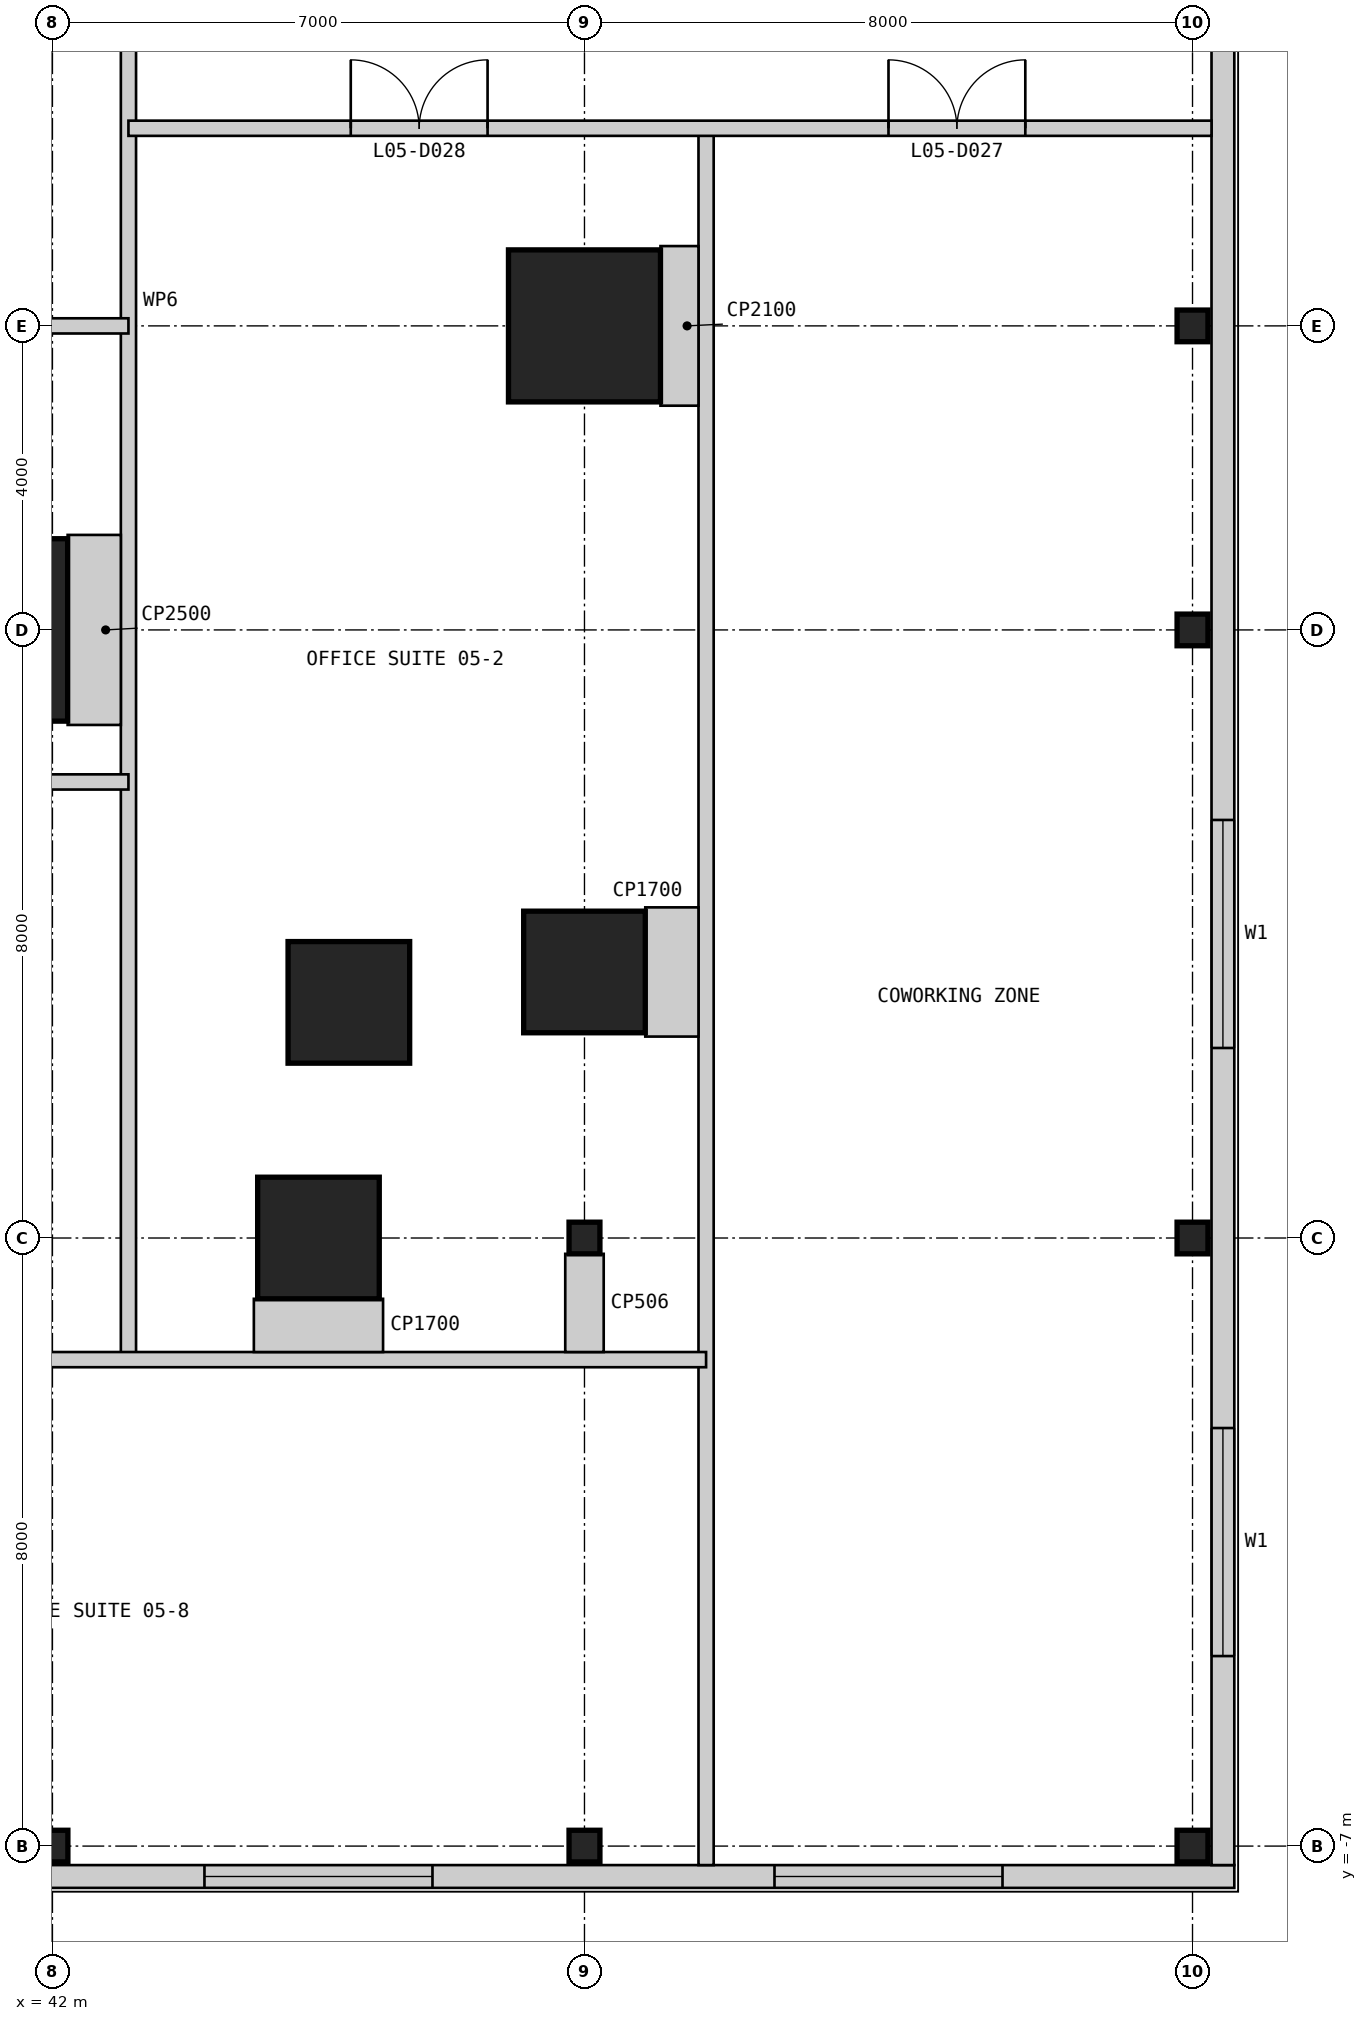
"""IFC4 building model, lengths in metres.
Left out: names, types, materials, properties, quantities, classifications, styles, units other than length and angle.
Written with IfcOpenShell. Run it as: python <this file> out.ifc"""

import sys

from ifc_helpers import new_model, si_unit, direction, frame, frame_2d, origin, origin_2d, place, context, subcontext, project, spatial, rectangle, i_section, extrude, element, fill, save


model = new_model("IFC4")
c1 = context("Model", 3, precision=1e-05, world=origin(), true_north=direction((0.0, 1.0)))
c2 = subcontext(c1, "Body", "Model", "MODEL_VIEW")
j1 = project(units=[si_unit("LENGTHUNIT", "METRE"), si_unit("PLANEANGLEUNIT", "RADIAN")], contexts=[c1])
p1 = place(None, origin())
s1 = spatial("IfcSite", under=j1, at=p1, CompositionType="ELEMENT")
p2 = place(p1, origin())
s2 = spatial("IfcBuilding", under=s1, at=p2, CompositionType="ELEMENT")
p3 = place(p2, frame((0.0, 0.0, 26.2)))
s3 = spatial("IfcBuildingStorey", under=s2, at=p3, CompositionType="ELEMENT", Elevation=26.2)
p4 = place(p3, frame((41.0, 9.0, 0.0), z_axis=(0.0, 0.0, 1.0), x_axis=(1.0, 0.0, 0.0)))
e1 = element("IfcColumn", 1, at=p4, inside=s3, PredefinedType="COLUMN", context=c2, shape_type="SweptSolid", body=[
    extrude(rectangle(XDim=2.4, YDim=2.4, at=origin_2d()), origin(), (0.0, 0.0, 1.0), 4.8),
])
for number, where, z_axis, x_axis in (
    (2, (45.5, 1.0, 0.0), (0.0, 0.0, 1.0), (1.0, 0.0, 0.0)),
    (3, (45.9, 4.1, 0.0), (0.0, 0.0, 1.0), (1.0, 0.0, 0.0)),
    (4, (49.0, 4.5, 0.0), (0.0, 0.0, 1.0), (1.0, 0.0, 0.0)),
):
    element("IfcColumn", number, at=place(p3, frame(where, z_axis=z_axis, x_axis=x_axis)), inside=s3, PredefinedType="COLUMN", context=c2, shape_type="SweptSolid", body=[
        extrude(rectangle(XDim=1.6, YDim=1.6, at=origin_2d()), origin(), (0.0, 0.0, 1.0), 4.8),
    ])
p5 = place(p3, frame((49.0, 13.0, 0.0), z_axis=(0.0, 0.0, 1.0), x_axis=(1.0, 0.0, 0.0)))
e5 = element("IfcColumn", 5, at=p5, inside=s3, PredefinedType="COLUMN", context=c2, shape_type="SweptSolid", body=[
    extrude(rectangle(XDim=2.0, YDim=2.0, at=origin_2d()), origin(), (0.0, 0.0, 1.0), 4.8),
])
for number, where, z_axis, x_axis in (
    (6, (42.0, -7.0, 0.0), (0.0, 0.0, 1.0), (1.0, 0.0, 0.0)),
    (7, (49.0, -7.0, 0.0), (0.0, 0.0, 1.0), (1.0, 0.0, 0.0)),
    (8, (49.0, 1.0, 0.0), (0.0, 0.0, 1.0), (1.0, 0.0, 0.0)),
    (9, (57.0, -7.0, 0.0), (0.0, 0.0, 1.0), (1.0, 0.0, 0.0)),
    (10, (57.0, 1.0, 0.0), (0.0, 0.0, 1.0), (1.0, 0.0, 0.0)),
    (11, (57.0, 9.0, 0.0), (0.0, 0.0, 1.0), (1.0, 0.0, 0.0)),
    (12, (57.0, 13.0, 0.0), (0.0, 0.0, 1.0), (1.0, 0.0, 0.0)),
):
    element("IfcColumn", number, at=place(p3, frame(where, z_axis=z_axis, x_axis=x_axis)), inside=s3, PredefinedType="COLUMN", context=c2, shape_type="SweptSolid", body=[
        extrude(i_section(OverallWidth=0.406, OverallDepth=0.417, WebThickness=0.03, FlangeThickness=0.048, at=origin_2d()), origin(), (0.0, 0.0, 1.0), 4.8),
    ])
p6 = place(p3, frame((-7.55, -7.4, 0.0), z_axis=(0.0, 0.0, 1.0), x_axis=(1.0, 0.0, 0.0)))
e13 = element("IfcWall", 13, at=p6, inside=s3, PredefinedType="SOLIDWALL", context=c2, shape_type="SweptSolid", body=[
    extrude(rectangle(XDim=65.1, YDim=0.3, at=frame_2d((32.55, 0.0))), origin(), (0.0, 0.0, 1.0), 4.5),
])
p7 = place(p6, frame((3.05, 0.0, 0.9)))
e14 = element("IfcOpeningElement", 14, at=p7, cuts=e13, PredefinedType="OPENING", context=c2, shape_type="SweptSolid", body=[
    extrude(rectangle(XDim=3.0, YDim=2.4, at=frame_2d((1.5, 1.2))), frame((0.0, 0.16, 0.0), z_axis=(0.0, -1.0, 0.0), x_axis=(1.0, 0.0, 0.0)), (0.0, 0.0, 1.0), 0.32),
])
p8 = place(p6, frame((11.05, 0.0, 0.9)))
e15 = element("IfcOpeningElement", 15, at=p8, cuts=e13, PredefinedType="OPENING", context=c2, shape_type="SweptSolid", body=[
    extrude(rectangle(XDim=3.0, YDim=2.4, at=frame_2d((1.5, 1.2))), frame((0.0, 0.16, 0.0), z_axis=(0.0, -1.0, 0.0), x_axis=(1.0, 0.0, 0.0)), (0.0, 0.0, 1.0), 0.32),
])
p9 = place(p6, frame((25.05, 0.0, 0.9)))
e16 = element("IfcOpeningElement", 16, at=p9, cuts=e13, PredefinedType="OPENING", context=c2, shape_type="SweptSolid", body=[
    extrude(rectangle(XDim=3.0, YDim=2.4, at=frame_2d((1.5, 1.2))), frame((0.0, 0.16, 0.0), z_axis=(0.0, -1.0, 0.0), x_axis=(1.0, 0.0, 0.0)), (0.0, 0.0, 1.0), 0.32),
])
p10 = place(p6, frame((37.05, 0.0, 0.9)))
e17 = element("IfcOpeningElement", 17, at=p10, cuts=e13, PredefinedType="OPENING", context=c2, shape_type="SweptSolid", body=[
    extrude(rectangle(XDim=3.0, YDim=2.4, at=frame_2d((1.5, 1.2))), frame((0.0, 0.16, 0.0), z_axis=(0.0, -1.0, 0.0), x_axis=(1.0, 0.0, 0.0)), (0.0, 0.0, 1.0), 0.32),
])
p11 = place(p6, frame((45.55, 0.0, 0.9)))
e18 = element("IfcOpeningElement", 18, at=p11, cuts=e13, PredefinedType="OPENING", context=c2, shape_type="SweptSolid", body=[
    extrude(rectangle(XDim=3.0, YDim=2.4, at=frame_2d((1.5, 1.2))), frame((0.0, 0.16, 0.0), z_axis=(0.0, -1.0, 0.0), x_axis=(1.0, 0.0, 0.0)), (0.0, 0.0, 1.0), 0.32),
])
p12 = place(p6, frame((51.55, 0.0, 0.9)))
e19 = element("IfcOpeningElement", 19, at=p12, cuts=e13, PredefinedType="OPENING", context=c2, shape_type="SweptSolid", body=[
    extrude(rectangle(XDim=3.0, YDim=2.4, at=frame_2d((1.5, 1.2))), frame((0.0, 0.16, 0.0), z_axis=(0.0, -1.0, 0.0), x_axis=(1.0, 0.0, 0.0)), (0.0, 0.0, 1.0), 0.32),
])
p13 = place(p6, frame((59.05, 0.0, 0.9)))
e20 = element("IfcOpeningElement", 20, at=p13, cuts=e13, PredefinedType="OPENING", context=c2, shape_type="SweptSolid", body=[
    extrude(rectangle(XDim=3.0, YDim=2.4, at=frame_2d((1.5, 1.2))), frame((0.0, 0.16, 0.0), z_axis=(0.0, -1.0, 0.0), x_axis=(1.0, 0.0, 0.0)), (0.0, 0.0, 1.0), 0.32),
])
p14 = place(p3, frame((57.4, -7.25, 0.0), z_axis=(0.0, 0.0, 1.0), x_axis=(0.0, 1.0, 0.0)))
e21 = element("IfcWall", 21, at=p14, inside=s3, PredefinedType="SOLIDWALL", context=c2, shape_type="SweptSolid", body=[
    extrude(rectangle(XDim=72.5, YDim=0.3, at=frame_2d((36.25, 0.0))), origin(), (0.0, 0.0, 1.0), 4.5),
])
p15 = place(p14, frame((2.75, 0.0, 0.9)))
e22 = element("IfcOpeningElement", 22, at=p15, cuts=e21, PredefinedType="OPENING", context=c2, shape_type="SweptSolid", body=[
    extrude(rectangle(XDim=3.0, YDim=2.4, at=frame_2d((1.5, 1.2))), frame((0.0, 0.16, 0.0), z_axis=(0.0, -1.0, 0.0), x_axis=(1.0, 0.0, 0.0)), (0.0, 0.0, 1.0), 0.32),
])
p16 = place(p14, frame((10.75, 0.0, 0.9)))
e23 = element("IfcOpeningElement", 23, at=p16, cuts=e21, PredefinedType="OPENING", context=c2, shape_type="SweptSolid", body=[
    extrude(rectangle(XDim=3.0, YDim=2.4, at=frame_2d((1.5, 1.2))), frame((0.0, 0.16, 0.0), z_axis=(0.0, -1.0, 0.0), x_axis=(1.0, 0.0, 0.0)), (0.0, 0.0, 1.0), 0.32),
])
p17 = place(p14, frame((24.75, 0.0, 0.9)))
e24 = element("IfcOpeningElement", 24, at=p17, cuts=e21, PredefinedType="OPENING", context=c2, shape_type="SweptSolid", body=[
    extrude(rectangle(XDim=3.0, YDim=2.4, at=frame_2d((1.5, 1.2))), frame((0.0, 0.16, 0.0), z_axis=(0.0, -1.0, 0.0), x_axis=(1.0, 0.0, 0.0)), (0.0, 0.0, 1.0), 0.32),
])
p18 = place(p14, frame((36.75, 0.0, 0.9)))
e25 = element("IfcOpeningElement", 25, at=p18, cuts=e21, PredefinedType="OPENING", context=c2, shape_type="SweptSolid", body=[
    extrude(rectangle(XDim=3.0, YDim=2.4, at=frame_2d((1.5, 1.2))), frame((0.0, 0.16, 0.0), z_axis=(0.0, -1.0, 0.0), x_axis=(1.0, 0.0, 0.0)), (0.0, 0.0, 1.0), 0.32),
])
p19 = place(p14, frame((45.25, 0.0, 0.9)))
e26 = element("IfcOpeningElement", 26, at=p19, cuts=e21, PredefinedType="OPENING", context=c2, shape_type="SweptSolid", body=[
    extrude(rectangle(XDim=3.0, YDim=2.4, at=frame_2d((1.5, 1.2))), frame((0.0, 0.16, 0.0), z_axis=(0.0, -1.0, 0.0), x_axis=(1.0, 0.0, 0.0)), (0.0, 0.0, 1.0), 0.32),
])
p20 = place(p14, frame((51.25, 0.0, 0.9)))
e27 = element("IfcOpeningElement", 27, at=p20, cuts=e21, PredefinedType="OPENING", context=c2, shape_type="SweptSolid", body=[
    extrude(rectangle(XDim=3.0, YDim=2.4, at=frame_2d((1.5, 1.2))), frame((0.0, 0.16, 0.0), z_axis=(0.0, -1.0, 0.0), x_axis=(1.0, 0.0, 0.0)), (0.0, 0.0, 1.0), 0.32),
])
p21 = place(p14, frame((58.75, 0.0, 0.9)))
e28 = element("IfcOpeningElement", 28, at=p21, cuts=e21, PredefinedType="OPENING", context=c2, shape_type="SweptSolid", body=[
    extrude(rectangle(XDim=3.0, YDim=2.4, at=frame_2d((1.5, 1.2))), frame((0.0, 0.16, 0.0), z_axis=(0.0, -1.0, 0.0), x_axis=(1.0, 0.0, 0.0)), (0.0, 0.0, 1.0), 0.32),
])
p22 = place(p14, frame((66.75, 0.0, 0.9)))
e29 = element("IfcOpeningElement", 29, at=p22, cuts=e21, PredefinedType="OPENING", context=c2, shape_type="SweptSolid", body=[
    extrude(rectangle(XDim=3.0, YDim=2.4, at=frame_2d((1.5, 1.2))), frame((0.0, 0.16, 0.0), z_axis=(0.0, -1.0, 0.0), x_axis=(1.0, 0.0, 0.0)), (0.0, 0.0, 1.0), 0.32),
])
p23 = place(p3, frame((43.0, -0.6, 0.0), z_axis=(0.0, 0.0, 1.0), x_axis=(0.0, 1.0, 0.0)))
e30 = element("IfcWall", 30, at=p23, inside=s3, PredefinedType="PARTITIONING", context=c2, shape_type="SweptSolid", body=[
    extrude(rectangle(XDim=28.6, YDim=0.2, at=frame_2d((14.3, 0.0))), origin(), (0.0, 0.0, 1.0), 3.893),
])
p24 = place(p3, frame((50.6, -7.25, 0.0), z_axis=(0.0, 0.0, 1.0), x_axis=(0.0, 1.0, 0.0)))
e31 = element("IfcWall", 31, at=p24, inside=s3, PredefinedType="PARTITIONING", context=c2, shape_type="SweptSolid", body=[
    extrude(rectangle(XDim=22.85, YDim=0.2, at=frame_2d((11.425, 0.0))), origin(), (0.0, 0.0, 1.0), 4.5),
])
p25 = place(p3, frame((34.4, -0.6, 0.0), z_axis=(0.0, 0.0, 1.0), x_axis=(1.0, 0.0, 0.0)))
e32 = element("IfcWall", 32, at=p25, inside=s3, PredefinedType="PARTITIONING", context=c2, shape_type="SweptSolid", body=[
    extrude(rectangle(XDim=16.2, YDim=0.2, at=frame_2d((8.1, 0.0))), origin(), (0.0, 0.0, 1.0), 4.5),
])
p26 = place(p3, frame((34.4, 7.0, 0.0), z_axis=(0.0, 0.0, 1.0), x_axis=(1.0, 0.0, 0.0)))
e33 = element("IfcWall", 33, at=p26, inside=s3, PredefinedType="PARTITIONING", context=c2, shape_type="SweptSolid", body=[
    extrude(rectangle(XDim=8.6, YDim=0.2, at=frame_2d((4.3, 0.0))), origin(), (0.0, 0.0, 1.0), 4.5),
])
p27 = place(p3, frame((37.0, 13.0, 0.0), z_axis=(0.0, 0.0, 1.0), x_axis=(1.0, 0.0, 0.0)))
e34 = element("IfcWall", 34, at=p27, inside=s3, PredefinedType="PARTITIONING", context=c2, shape_type="SweptSolid", body=[
    extrude(rectangle(XDim=6.0, YDim=0.2, at=frame_2d((3.0, 0.0))), origin(), (0.0, 0.0, 1.0), 3.703),
])
p28 = place(p3, frame((43.0, 15.6, 0.0), z_axis=(0.0, 0.0, 1.0), x_axis=(1.0, 0.0, 0.0)))
e35 = element("IfcWall", 35, at=p28, inside=s3, PredefinedType="PARTITIONING", context=c2, shape_type="SweptSolid", body=[
    extrude(rectangle(XDim=14.25, YDim=0.2, at=frame_2d((7.125, 0.0))), origin(), (0.0, 0.0, 1.0), 4.5),
])
p29 = place(p28, frame((10.0, 0.0, 0.0)))
e36 = element("IfcOpeningElement", 36, at=p29, cuts=e35, PredefinedType="OPENING", context=c2, shape_type="SweptSolid", body=[
    extrude(rectangle(XDim=1.8, YDim=2.4, at=frame_2d((0.9, 1.2))), frame((0.0, 0.11, 0.0), z_axis=(0.0, -1.0, 0.0), x_axis=(1.0, 0.0, 0.0)), (0.0, 0.0, 1.0), 0.22),
])
p30 = place(p28, frame((2.925, 0.0, 0.0)))
e37 = element("IfcOpeningElement", 37, at=p30, cuts=e35, PredefinedType="OPENING", context=c2, shape_type="SweptSolid", body=[
    extrude(rectangle(XDim=1.8, YDim=2.4, at=frame_2d((0.9, 1.2))), frame((0.0, 0.11, 0.0), z_axis=(0.0, -1.0, 0.0), x_axis=(1.0, 0.0, 0.0)), (0.0, 0.0, 1.0), 0.22),
])
for number, where, z_axis, x_axis in (
    (38, (45.5, -0.5, 0.0), (0.0, 0.0, 1.0), (0.0, 1.0, 0.0)),
    (39, (50.5, 4.5, 0.0), (0.0, 0.0, 1.0), (-1.0, 0.0, 0.0)),
):
    element("IfcWall", number, at=place(p3, frame(where, z_axis=z_axis, x_axis=x_axis)), inside=s3, PredefinedType="PARTITIONING", context=c2, shape_type="SweptSolid", body=[
        extrude(rectangle(XDim=0.7, YDim=1.7, at=frame_2d((0.35, 0.0))), origin(), (0.0, 0.0, 1.0), 4.5),
    ])
p31 = place(p3, frame((50.5, 13.0, 0.0), z_axis=(0.0, 0.0, 1.0), x_axis=(-1.0, 0.0, 0.0)))
e40 = element("IfcWall", 40, at=p31, inside=s3, PredefinedType="PARTITIONING", context=c2, shape_type="SweptSolid", body=[
    extrude(rectangle(XDim=0.5, YDim=2.1, at=frame_2d((0.25, 0.0))), origin(), (0.0, 0.0, 1.0), 4.5),
])
p32 = place(p3, frame((49.0, -0.5, 0.0), z_axis=(0.0, 0.0, 1.0), x_axis=(0.0, 1.0, 0.0)))
e41 = element("IfcWall", 41, at=p32, inside=s3, PredefinedType="PARTITIONING", context=c2, shape_type="SweptSolid", body=[
    extrude(rectangle(XDim=1.292, YDim=0.506, at=frame_2d((0.646, 0.0))), origin(), (0.0, 0.0, 1.0), 3.654),
])
p33 = place(p3, frame((42.9, 9.0, 0.0), z_axis=(0.0, 0.0, 1.0), x_axis=(-1.0, 0.0, 0.0)))
e42 = element("IfcWall", 42, at=p33, inside=s3, PredefinedType="PARTITIONING", context=c2, shape_type="SweptSolid", body=[
    extrude(rectangle(XDim=0.7, YDim=2.5, at=frame_2d((0.35, 0.0))), origin(), (0.0, 0.0, 1.0), 4.5),
])
p34 = place(p12, origin())
e43 = element("IfcWindow", 43, at=p34, inside=s3, PartitioningType="SINGLE_PANEL", PredefinedType="WINDOW", context=c2, shape_type="SweptSolid", body=[
    extrude(rectangle(XDim=3.0, YDim=2.4, at=frame_2d((1.5, 1.2))), frame((0.0, 0.03, 0.0), z_axis=(0.0, -1.0, 0.0), x_axis=(1.0, 0.0, 0.0)), (0.0, 0.0, 1.0), 0.06),
])
fill(e19, e43)
p35 = place(p13, origin())
e44 = element("IfcWindow", 44, at=p35, inside=s3, PartitioningType="SINGLE_PANEL", PredefinedType="WINDOW", context=c2, shape_type="SweptSolid", body=[
    extrude(rectangle(XDim=3.0, YDim=2.4, at=frame_2d((1.5, 1.2))), frame((0.0, 0.03, 0.0), z_axis=(0.0, -1.0, 0.0), x_axis=(1.0, 0.0, 0.0)), (0.0, 0.0, 1.0), 0.06),
])
fill(e20, e44)
p36 = place(p15, origin())
e45 = element("IfcWindow", 45, at=p36, inside=s3, PartitioningType="SINGLE_PANEL", PredefinedType="WINDOW", context=c2, shape_type="SweptSolid", body=[
    extrude(rectangle(XDim=3.0, YDim=2.4, at=frame_2d((1.5, 1.2))), frame((0.0, 0.03, 0.0), z_axis=(0.0, -1.0, 0.0), x_axis=(1.0, 0.0, 0.0)), (0.0, 0.0, 1.0), 0.06),
])
fill(e22, e45)
p37 = place(p16, origin())
e46 = element("IfcWindow", 46, at=p37, inside=s3, PartitioningType="SINGLE_PANEL", PredefinedType="WINDOW", context=c2, shape_type="SweptSolid", body=[
    extrude(rectangle(XDim=3.0, YDim=2.4, at=frame_2d((1.5, 1.2))), frame((0.0, 0.03, 0.0), z_axis=(0.0, -1.0, 0.0), x_axis=(1.0, 0.0, 0.0)), (0.0, 0.0, 1.0), 0.06),
])
fill(e23, e46)
p38 = place(p29, origin())
e47 = element("IfcDoor", 47, at=p38, inside=s3, OperationType="DOUBLE_DOOR_SINGLE_SWING", PredefinedType="DOOR", context=c2, shape_type="SweptSolid", body=[
    extrude(rectangle(XDim=1.8, YDim=2.4, at=frame_2d((0.9, 1.2))), frame((0.0, 0.025, 0.0), z_axis=(0.0, -1.0, 0.0), x_axis=(1.0, 0.0, 0.0)), (0.0, 0.0, 1.0), 0.05),
])
fill(e36, e47)
p39 = place(p30, origin())
e48 = element("IfcDoor", 48, at=p39, inside=s3, OperationType="DOUBLE_DOOR_SINGLE_SWING", PredefinedType="DOOR", context=c2, shape_type="SweptSolid", body=[
    extrude(rectangle(XDim=1.8, YDim=2.4, at=frame_2d((0.9, 1.2))), frame((0.0, 0.025, 0.0), z_axis=(0.0, -1.0, 0.0), x_axis=(1.0, 0.0, 0.0)), (0.0, 0.0, 1.0), 0.05),
])
fill(e37, e48)
save(model, sys.argv[1])
